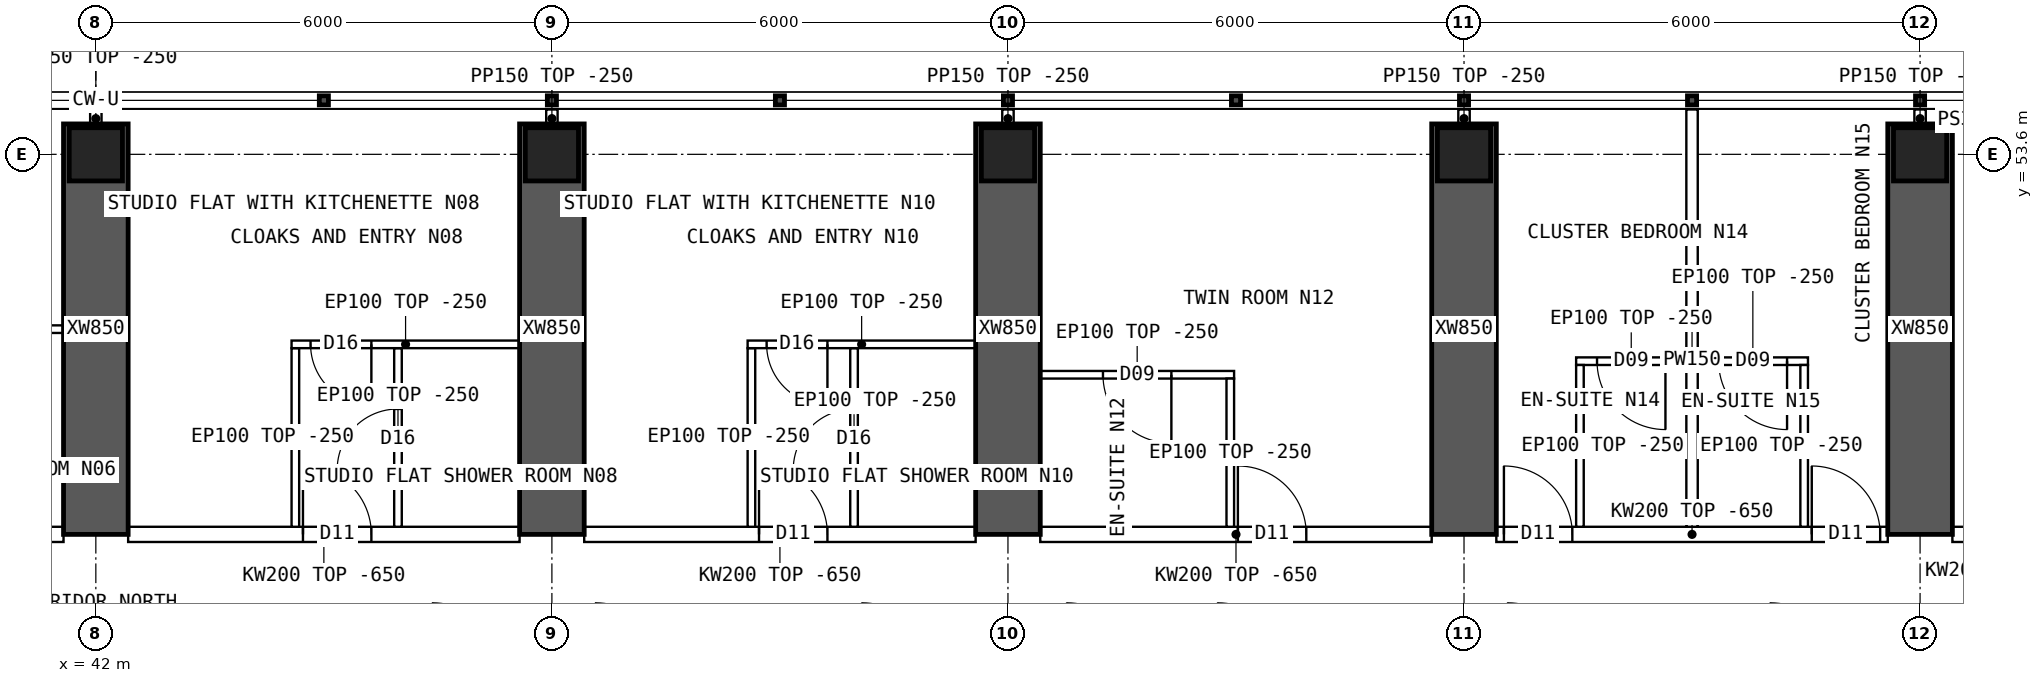
"""IFC4 building model, lengths in metres.
Left out: names, types, materials, properties, quantities, classifications, styles, units other than length and angle.
Written with IfcOpenShell. Run it as: python <this file> out.ifc"""

import sys

from ifc_helpers import new_model, si_unit, direction, frame, frame_2d, origin, origin_2d, place, context, subcontext, project, spatial, polyline, rectangle, hollow_rectangle, outline, extrude, element, fill, save


model = new_model("IFC4")
c1 = context("Model", 3, precision=1e-05, world=origin(), true_north=direction((0.0, 1.0)))
c2 = subcontext(c1, "Body", "Model", "MODEL_VIEW")
j1 = project(units=[si_unit("LENGTHUNIT", "METRE"), si_unit("PLANEANGLEUNIT", "RADIAN")], contexts=[c1])
p1 = place(None, origin())
s1 = spatial("IfcSite", under=j1, at=p1, CompositionType="ELEMENT")
p2 = place(p1, origin())
s2 = spatial("IfcBuilding", under=s1, at=p2, CompositionType="ELEMENT")
p3 = place(p2, frame((0.0, 0.0, 163.6)))
s3 = spatial("IfcBuildingStorey", under=s2, at=p3, CompositionType="ELEMENT", Elevation=163.6)
for number, where, z_axis, x_axis in (
    (1, (42.0, 53.6, 0.0), (0.0, 0.0, 1.0), (1.0, 0.0, 0.0)),
    (2, (48.0, 53.6, 0.0), (0.0, 0.0, 1.0), (1.0, 0.0, 0.0)),
    (3, (54.0, 53.6, 0.0), (0.0, 0.0, 1.0), (1.0, 0.0, 0.0)),
    (4, (60.0, 53.6, 0.0), (0.0, 0.0, 1.0), (1.0, 0.0, 0.0)),
    (5, (66.0, 53.6, 0.0), (0.0, 0.0, 1.0), (1.0, 0.0, 0.0)),
):
    element("IfcColumn", number, at=place(p3, frame(where, z_axis=z_axis, x_axis=x_axis)), inside=s3, PredefinedType="COLUMN", context=c2, shape_type="SweptSolid", body=[
        extrude(hollow_rectangle(XDim=0.7, YDim=0.7, WallThickness=0.07, at=origin_2d()), origin(), (0.0, 0.0, 1.0), 3.75),
    ])
for number, where, z_axis, x_axis in (
    (6, (42.0, 48.6, 0.0), (0.0, 0.0, 1.0), (0.0, 1.0, 0.0)),
    (7, (48.0, 48.6, 0.0), (0.0, 0.0, 1.0), (0.0, 1.0, 0.0)),
    (8, (54.0, 48.6, 0.0), (0.0, 0.0, 1.0), (0.0, 1.0, 0.0)),
    (9, (60.0, 48.6, 0.0), (0.0, 0.0, 1.0), (0.0, 1.0, 0.0)),
    (10, (66.0, 48.6, 0.0), (0.0, 0.0, 1.0), (0.0, 1.0, 0.0)),
):
    element("IfcWall", number, at=place(p3, frame(where, z_axis=z_axis, x_axis=x_axis)), inside=s3, PredefinedType="SHEAR", context=c2, shape_type="SweptSolid", body=[
        extrude(rectangle(XDim=5.4, YDim=0.85, at=frame_2d((2.7, 0.0))), origin(), (0.0, 0.0, 1.0), 3.75),
    ])
p4 = place(p3, frame((66.8, 54.05, 0.0), z_axis=(0.0, 0.0, 1.0), x_axis=(-1.0, 0.0, 0.0)))
e11 = element("IfcWall", 11, at=p4, inside=s3, PredefinedType="SOLIDWALL", context=c2, shape_type="SweptSolid", body=[
    extrude(rectangle(XDim=0.375, YDim=0.3, at=frame_2d((0.188, 0.0))), origin(), (0.0, 0.0, 1.0), 3.5),
])
p5 = place(p3, frame((36.425, 48.6, 0.0), z_axis=(0.0, 0.0, 1.0), x_axis=(1.0, 0.0, 0.0)))
e12 = element("IfcWall", 12, at=p5, inside=s3, PredefinedType="SOLIDWALL", context=c2, shape_type="SweptSolid", body=[
    extrude(outline(polyline([(0.0, 0.0), (5.15, 0.0), (5.15, 3.1), (0.0, 3.1), (0.0, 0.0)])), frame((0.0, 0.1, 0.0), z_axis=(0.0, -1.0, 0.0), x_axis=(1.0, 0.0, 0.0)), (0.0, 0.0, 1.0), 0.2),
])
p6 = place(p5, frame((0.3, 0.0, 0.0)))
e13 = element("IfcOpeningElement", 13, at=p6, cuts=e12, PredefinedType="OPENING", context=c2, shape_type="SweptSolid", body=[
    extrude(rectangle(XDim=1.0, YDim=2.1, at=frame_2d((0.5, 1.05))), frame((0.0, 0.11, 0.0), z_axis=(0.0, -1.0, 0.0), x_axis=(1.0, 0.0, 0.0)), (0.0, 0.0, 1.0), 0.22),
])
p7 = place(p3, frame((42.425, 48.6, 0.0), z_axis=(0.0, 0.0, 1.0), x_axis=(1.0, 0.0, 0.0)))
e14 = element("IfcWall", 14, at=p7, inside=s3, PredefinedType="SOLIDWALL", context=c2, shape_type="SweptSolid", body=[
    extrude(outline(polyline([(0.0, 0.0), (5.15, 0.0), (5.15, 3.1), (0.0, 3.1), (0.0, 0.0)])), frame((0.0, 0.1, 0.0), z_axis=(0.0, -1.0, 0.0), x_axis=(1.0, 0.0, 0.0)), (0.0, 0.0, 1.0), 0.2),
])
p8 = place(p7, frame((2.3, 0.0, 0.0)))
e15 = element("IfcOpeningElement", 15, at=p8, cuts=e14, PredefinedType="OPENING", context=c2, shape_type="SweptSolid", body=[
    extrude(rectangle(XDim=0.9, YDim=2.1, at=frame_2d((0.45, 1.05))), frame((0.0, 0.11, 0.0), z_axis=(0.0, -1.0, 0.0), x_axis=(1.0, 0.0, 0.0)), (0.0, 0.0, 1.0), 0.22),
])
p9 = place(p3, frame((48.425, 48.6, 0.0), z_axis=(0.0, 0.0, 1.0), x_axis=(1.0, 0.0, 0.0)))
e16 = element("IfcWall", 16, at=p9, inside=s3, PredefinedType="SOLIDWALL", context=c2, shape_type="SweptSolid", body=[
    extrude(outline(polyline([(0.0, 0.0), (5.15, 0.0), (5.15, 3.1), (0.0, 3.1), (0.0, 0.0)])), frame((0.0, 0.1, 0.0), z_axis=(0.0, -1.0, 0.0), x_axis=(1.0, 0.0, 0.0)), (0.0, 0.0, 1.0), 0.2),
])
p10 = place(p9, frame((2.3, 0.0, 0.0)))
e17 = element("IfcOpeningElement", 17, at=p10, cuts=e16, PredefinedType="OPENING", context=c2, shape_type="SweptSolid", body=[
    extrude(rectangle(XDim=0.9, YDim=2.1, at=frame_2d((0.45, 1.05))), frame((0.0, 0.11, 0.0), z_axis=(0.0, -1.0, 0.0), x_axis=(1.0, 0.0, 0.0)), (0.0, 0.0, 1.0), 0.22),
])
p11 = place(p3, frame((54.425, 48.6, 0.0), z_axis=(0.0, 0.0, 1.0), x_axis=(1.0, 0.0, 0.0)))
e18 = element("IfcWall", 18, at=p11, inside=s3, PredefinedType="SOLIDWALL", context=c2, shape_type="SweptSolid", body=[
    extrude(outline(polyline([(0.0, 0.0), (5.15, 0.0), (5.15, 3.1), (0.0, 3.1), (0.0, 0.0)])), frame((0.0, 0.1, 0.0), z_axis=(0.0, -1.0, 0.0), x_axis=(1.0, 0.0, 0.0)), (0.0, 0.0, 1.0), 0.2),
])
p12 = place(p11, frame((2.6, 0.0, 0.0)))
e19 = element("IfcOpeningElement", 19, at=p12, cuts=e18, PredefinedType="OPENING", context=c2, shape_type="SweptSolid", body=[
    extrude(rectangle(XDim=0.9, YDim=2.1, at=frame_2d((0.45, 1.05))), frame((0.0, 0.11, 0.0), z_axis=(0.0, -1.0, 0.0), x_axis=(1.0, 0.0, 0.0)), (0.0, 0.0, 1.0), 0.22),
])
p13 = place(p3, frame((60.425, 48.6, 0.0), z_axis=(0.0, 0.0, 1.0), x_axis=(1.0, 0.0, 0.0)))
e20 = element("IfcWall", 20, at=p13, inside=s3, PredefinedType="SOLIDWALL", context=c2, shape_type="SweptSolid", body=[
    extrude(outline(polyline([(0.0, 0.0), (5.15, 0.0), (5.15, 3.1), (0.0, 3.1), (0.0, 0.0)])), frame((0.0, 0.1, 0.0), z_axis=(0.0, -1.0, 0.0), x_axis=(1.0, 0.0, 0.0)), (0.0, 0.0, 1.0), 0.2),
])
p14 = place(p13, frame((0.1, 0.0, 0.0)))
e21 = element("IfcOpeningElement", 21, at=p14, cuts=e20, PredefinedType="OPENING", context=c2, shape_type="SweptSolid", body=[
    extrude(rectangle(XDim=0.9, YDim=2.1, at=frame_2d((0.45, 1.05))), frame((0.0, 0.11, 0.0), z_axis=(0.0, -1.0, 0.0), x_axis=(1.0, 0.0, 0.0)), (0.0, 0.0, 1.0), 0.22),
])
p15 = place(p13, frame((4.15, 0.0, 0.0)))
e22 = element("IfcOpeningElement", 22, at=p15, cuts=e20, PredefinedType="OPENING", context=c2, shape_type="SweptSolid", body=[
    extrude(rectangle(XDim=0.9, YDim=2.1, at=frame_2d((0.45, 1.05))), frame((0.0, 0.11, 0.0), z_axis=(0.0, -1.0, 0.0), x_axis=(1.0, 0.0, 0.0)), (0.0, 0.0, 1.0), 0.22),
])
p16 = place(p3, frame((66.425, 48.6, 0.0), z_axis=(0.0, 0.0, 1.0), x_axis=(1.0, 0.0, 0.0)))
e23 = element("IfcWall", 23, at=p16, inside=s3, PredefinedType="SOLIDWALL", context=c2, shape_type="SweptSolid", body=[
    extrude(rectangle(XDim=1.975, YDim=0.2, at=frame_2d((0.987, 0.0))), origin(), (0.0, 0.0, 1.0), 3.5),
])
p17 = place(p16, frame((0.2, 0.0, 0.0)))
e24 = element("IfcOpeningElement", 24, at=p17, cuts=e23, PredefinedType="OPENING", context=c2, shape_type="SweptSolid", body=[
    extrude(rectangle(XDim=0.9, YDim=2.1, at=frame_2d((0.45, 1.05))), frame((0.0, 0.11, 0.0), z_axis=(0.0, -1.0, 0.0), x_axis=(1.0, 0.0, 0.0)), (0.0, 0.0, 1.0), 0.22),
])
p18 = place(p3, frame((38.925, 51.3, 0.0), z_axis=(0.0, 0.0, 1.0), x_axis=(1.0, 0.0, 0.0)))
e25 = element("IfcWall", 25, at=p18, inside=s3, PredefinedType="PARTITIONING", context=c2, shape_type="SweptSolid", body=[
    extrude(rectangle(XDim=2.65, YDim=0.1, at=frame_2d((1.325, 0.0))), origin(), (0.0, 0.0, 1.0), 3.5),
])
p19 = place(p3, frame((44.575, 51.1, 0.0), z_axis=(0.0, 0.0, 1.0), x_axis=(1.0, 0.0, 0.0)))
e26 = element("IfcWall", 26, at=p19, inside=s3, PredefinedType="PARTITIONING", context=c2, shape_type="SweptSolid", body=[
    extrude(rectangle(XDim=3.0, YDim=0.1, at=frame_2d((1.5, 0.0))), origin(), (0.0, 0.0, 1.0), 3.5),
])
p20 = place(p19, frame((0.25, 0.0, 0.0)))
e27 = element("IfcOpeningElement", 27, at=p20, cuts=e26, PredefinedType="OPENING", context=c2, shape_type="SweptSolid", body=[
    extrude(rectangle(XDim=0.8, YDim=2.1, at=frame_2d((0.4, 1.05))), frame((0.0, 0.06, 0.0), z_axis=(0.0, -1.0, 0.0), x_axis=(1.0, 0.0, 0.0)), (0.0, 0.0, 1.0), 0.12),
])
p21 = place(p3, frame((44.625, 51.05, 0.0), z_axis=(0.0, 0.0, 1.0), x_axis=(0.0, -1.0, 0.0)))
e28 = element("IfcWall", 28, at=p21, inside=s3, PredefinedType="PARTITIONING", context=c2, shape_type="SweptSolid", body=[
    extrude(outline(polyline([(0.0, 0.0), (2.35, 0.0), (2.35, 3.1), (2.302, 3.1), (2.3, 3.5), (0.0, 3.5), (0.0, 0.0)])), frame((0.0, 0.05, 0.0), z_axis=(0.0, -1.0, 0.0), x_axis=(1.0, 0.0, 0.0)), (0.0, 0.0, 1.0), 0.1),
])
p22 = place(p3, frame((45.975, 51.05, 0.0), z_axis=(0.0, 0.0, 1.0), x_axis=(0.0, -1.0, 0.0)))
e29 = element("IfcWall", 29, at=p22, inside=s3, PredefinedType="PARTITIONING", context=c2, shape_type="SweptSolid", body=[
    extrude(outline(polyline([(0.0, 0.0), (2.35, 0.0), (2.35, 3.1), (2.302, 3.1), (2.3, 3.5), (0.0, 3.5), (0.0, 0.0)])), frame((0.0, 0.05, 0.0), z_axis=(0.0, -1.0, 0.0), x_axis=(1.0, 0.0, 0.0)), (0.0, 0.0, 1.0), 0.1),
])
p23 = place(p22, frame((0.8, 0.0, 0.0)))
e30 = element("IfcOpeningElement", 30, at=p23, cuts=e29, PredefinedType="OPENING", context=c2, shape_type="SweptSolid", body=[
    extrude(rectangle(XDim=0.8, YDim=2.1, at=frame_2d((0.4, 1.05))), frame((0.0, 0.06, 0.0), z_axis=(0.0, -1.0, 0.0), x_axis=(1.0, 0.0, 0.0)), (0.0, 0.0, 1.0), 0.12),
])
p24 = place(p3, frame((50.575, 51.1, 0.0), z_axis=(0.0, 0.0, 1.0), x_axis=(1.0, 0.0, 0.0)))
e31 = element("IfcWall", 31, at=p24, inside=s3, PredefinedType="PARTITIONING", context=c2, shape_type="SweptSolid", body=[
    extrude(rectangle(XDim=3.0, YDim=0.1, at=frame_2d((1.5, 0.0))), origin(), (0.0, 0.0, 1.0), 3.5),
])
p25 = place(p24, frame((0.25, 0.0, 0.0)))
e32 = element("IfcOpeningElement", 32, at=p25, cuts=e31, PredefinedType="OPENING", context=c2, shape_type="SweptSolid", body=[
    extrude(rectangle(XDim=0.8, YDim=2.1, at=frame_2d((0.4, 1.05))), frame((0.0, 0.06, 0.0), z_axis=(0.0, -1.0, 0.0), x_axis=(1.0, 0.0, 0.0)), (0.0, 0.0, 1.0), 0.12),
])
p26 = place(p3, frame((50.625, 51.05, 0.0), z_axis=(0.0, 0.0, 1.0), x_axis=(0.0, -1.0, 0.0)))
e33 = element("IfcWall", 33, at=p26, inside=s3, PredefinedType="PARTITIONING", context=c2, shape_type="SweptSolid", body=[
    extrude(outline(polyline([(0.0, 0.0), (2.35, 0.0), (2.35, 3.1), (2.302, 3.1), (2.3, 3.5), (0.0, 3.5), (0.0, 0.0)])), frame((0.0, 0.05, 0.0), z_axis=(0.0, -1.0, 0.0), x_axis=(1.0, 0.0, 0.0)), (0.0, 0.0, 1.0), 0.1),
])
p27 = place(p3, frame((51.975, 51.05, 0.0), z_axis=(0.0, 0.0, 1.0), x_axis=(0.0, -1.0, 0.0)))
e34 = element("IfcWall", 34, at=p27, inside=s3, PredefinedType="PARTITIONING", context=c2, shape_type="SweptSolid", body=[
    extrude(outline(polyline([(0.0, 0.0), (2.35, 0.0), (2.35, 3.1), (2.302, 3.1), (2.3, 3.5), (0.0, 3.5), (0.0, 0.0)])), frame((0.0, 0.05, 0.0), z_axis=(0.0, -1.0, 0.0), x_axis=(1.0, 0.0, 0.0)), (0.0, 0.0, 1.0), 0.1),
])
p28 = place(p27, frame((0.8, 0.0, 0.0)))
e35 = element("IfcOpeningElement", 35, at=p28, cuts=e34, PredefinedType="OPENING", context=c2, shape_type="SweptSolid", body=[
    extrude(rectangle(XDim=0.8, YDim=2.1, at=frame_2d((0.4, 1.05))), frame((0.0, 0.06, 0.0), z_axis=(0.0, -1.0, 0.0), x_axis=(1.0, 0.0, 0.0)), (0.0, 0.0, 1.0), 0.12),
])
p29 = place(p3, frame((54.425, 50.7, 0.0), z_axis=(0.0, 0.0, 1.0), x_axis=(1.0, 0.0, 0.0)))
e36 = element("IfcWall", 36, at=p29, inside=s3, PredefinedType="PARTITIONING", context=c2, shape_type="SweptSolid", body=[
    extrude(rectangle(XDim=2.55, YDim=0.1, at=frame_2d((1.275, 0.0))), origin(), (0.0, 0.0, 1.0), 3.5),
])
p30 = place(p29, frame((0.825, 0.0, 0.0)))
e37 = element("IfcOpeningElement", 37, at=p30, cuts=e36, PredefinedType="OPENING", context=c2, shape_type="SweptSolid", body=[
    extrude(rectangle(XDim=0.9, YDim=2.1, at=frame_2d((0.45, 1.05))), frame((0.0, 0.06, 0.0), z_axis=(0.0, -1.0, 0.0), x_axis=(1.0, 0.0, 0.0)), (0.0, 0.0, 1.0), 0.12),
])
p31 = place(p3, frame((56.925, 50.65, 0.0), z_axis=(0.0, 0.0, 1.0), x_axis=(0.0, -1.0, 0.0)))
e38 = element("IfcWall", 38, at=p31, inside=s3, PredefinedType="PARTITIONING", context=c2, shape_type="SweptSolid", body=[
    extrude(outline(polyline([(0.0, 0.0), (1.95, 0.0), (1.95, 3.1), (1.902, 3.1), (1.9, 3.5), (0.0, 3.5), (0.0, 0.0)])), frame((0.0, 0.05, 0.0), z_axis=(0.0, -1.0, 0.0), x_axis=(1.0, 0.0, 0.0)), (0.0, 0.0, 1.0), 0.1),
])
p32 = place(p3, frame((63.0, 54.19, 0.0), z_axis=(0.0, 0.0, 1.0), x_axis=(0.0, -1.0, 0.0)))
e39 = element("IfcWall", 39, at=p32, inside=s3, PredefinedType="PARTITIONING", context=c2, shape_type="SweptSolid", body=[
    extrude(outline(polyline([(0.0, 0.0), (5.49, 0.0), (5.49, 3.1), (5.442, 3.1), (5.44, 3.5), (0.792, 3.5), (0.79, 3.1), (0.392, 3.1), (0.39, 3.5), (0.0, 3.5), (0.0, 0.0)])), frame((0.0, 0.075, 0.0), z_axis=(0.0, -1.0, 0.0), x_axis=(1.0, 0.0, 0.0)), (0.0, 0.0, 1.0), 0.15),
])
p33 = place(p3, frame((61.475, 50.879, 0.0), z_axis=(0.0, 0.0, 1.0), x_axis=(1.0, 0.0, 0.0)))
e40 = element("IfcWall", 40, at=p33, inside=s3, PredefinedType="PARTITIONING", context=c2, shape_type="SweptSolid", body=[
    extrude(rectangle(XDim=1.45, YDim=0.1, at=frame_2d((0.725, 0.0))), origin(), (0.0, 0.0, 1.0), 3.5),
])
p34 = place(p33, frame((0.275, 0.0, 0.0)))
e41 = element("IfcOpeningElement", 41, at=p34, cuts=e40, PredefinedType="OPENING", context=c2, shape_type="SweptSolid", body=[
    extrude(rectangle(XDim=0.9, YDim=2.1, at=frame_2d((0.45, 1.05))), frame((0.0, 0.06, 0.0), z_axis=(0.0, -1.0, 0.0), x_axis=(1.0, 0.0, 0.0)), (0.0, 0.0, 1.0), 0.12),
])
p35 = place(p3, frame((61.525, 50.829, 0.0), z_axis=(0.0, 0.0, 1.0), x_axis=(0.0, -1.0, 0.0)))
e42 = element("IfcWall", 42, at=p35, inside=s3, PredefinedType="PARTITIONING", context=c2, shape_type="SweptSolid", body=[
    extrude(outline(polyline([(0.0, 0.0), (2.129, 0.0), (2.129, 3.1), (2.081, 3.1), (2.079, 3.5), (0.0, 3.5), (0.0, 0.0)])), frame((0.0, 0.05, 0.0), z_axis=(0.0, -1.0, 0.0), x_axis=(1.0, 0.0, 0.0)), (0.0, 0.0, 1.0), 0.1),
])
p36 = place(p3, frame((63.075, 50.879, 0.0), z_axis=(0.0, 0.0, 1.0), x_axis=(1.0, 0.0, 0.0)))
e43 = element("IfcWall", 43, at=p36, inside=s3, PredefinedType="PARTITIONING", context=c2, shape_type="SweptSolid", body=[
    extrude(rectangle(XDim=1.45, YDim=0.1, at=frame_2d((0.725, 0.0))), origin(), (0.0, 0.0, 1.0), 3.5),
])
p37 = place(p36, frame((0.275, 0.0, 0.0)))
e44 = element("IfcOpeningElement", 44, at=p37, cuts=e43, PredefinedType="OPENING", context=c2, shape_type="SweptSolid", body=[
    extrude(rectangle(XDim=0.9, YDim=2.1, at=frame_2d((0.45, 1.05))), frame((0.0, 0.06, 0.0), z_axis=(0.0, -1.0, 0.0), x_axis=(1.0, 0.0, 0.0)), (0.0, 0.0, 1.0), 0.12),
])
p38 = place(p3, frame((64.475, 50.829, 0.0), z_axis=(0.0, 0.0, 1.0), x_axis=(0.0, -1.0, 0.0)))
e45 = element("IfcWall", 45, at=p38, inside=s3, PredefinedType="PARTITIONING", context=c2, shape_type="SweptSolid", body=[
    extrude(outline(polyline([(0.0, 0.0), (2.129, 0.0), (2.129, 3.1), (2.081, 3.1), (2.079, 3.5), (0.0, 3.5), (0.0, 0.0)])), frame((0.0, 0.05, 0.0), z_axis=(0.0, -1.0, 0.0), x_axis=(1.0, 0.0, 0.0)), (0.0, 0.0, 1.0), 0.1),
])
for number, where, z_axis, x_axis in (
    (46, (42.0, 53.95, 0.0), (0.0, 0.0, 1.0), (0.0, 1.0, 0.0)),
    (47, (48.0, 53.95, 0.0), (0.0, 0.0, 1.0), (0.0, 1.0, 0.0)),
    (48, (54.0, 53.95, 0.0), (0.0, 0.0, 1.0), (0.0, 1.0, 0.0)),
    (49, (60.0, 53.95, 0.0), (0.0, 0.0, 1.0), (0.0, 1.0, 0.0)),
    (50, (66.0, 53.95, 0.0), (0.0, 0.0, 1.0), (0.0, 1.0, 0.0)),
):
    element("IfcWall", number, at=place(p3, frame(where, z_axis=z_axis, x_axis=x_axis)), inside=s3, PredefinedType="PARTITIONING", context=c2, shape_type="SweptSolid", body=[
        extrude(rectangle(XDim=0.24, YDim=0.15, at=frame_2d((0.12, 0.0))), origin(), (0.0, 0.0, 1.0), 3.5),
    ])
p39 = place(p20, origin())
e51 = element("IfcDoor", 51, at=p39, inside=s3, OperationType="SINGLE_SWING_RIGHT", PredefinedType="DOOR", context=c2, shape_type="SweptSolid", body=[
    extrude(rectangle(XDim=0.8, YDim=2.1, at=frame_2d((0.4, 1.05))), frame((0.0, 0.025, 0.0), z_axis=(0.0, -1.0, 0.0), x_axis=(1.0, 0.0, 0.0)), (0.0, 0.0, 1.0), 0.05),
])
fill(e27, e51)
p40 = place(p23, origin())
e52 = element("IfcDoor", 52, at=p40, inside=s3, OperationType="SINGLE_SWING_RIGHT", PredefinedType="DOOR", context=c2, shape_type="SweptSolid", body=[
    extrude(rectangle(XDim=0.8, YDim=2.1, at=frame_2d((0.4, 1.05))), frame((0.0, 0.025, 0.0), z_axis=(0.0, -1.0, 0.0), x_axis=(1.0, 0.0, 0.0)), (0.0, 0.0, 1.0), 0.05),
])
fill(e30, e52)
p41 = place(p8, origin())
e53 = element("IfcDoor", 53, at=p41, inside=s3, OperationType="SINGLE_SWING_LEFT", PredefinedType="DOOR", context=c2, shape_type="SweptSolid", body=[
    extrude(rectangle(XDim=0.9, YDim=2.1, at=frame_2d((0.45, 1.05))), frame((0.0, 0.025, 0.0), z_axis=(0.0, -1.0, 0.0), x_axis=(1.0, 0.0, 0.0)), (0.0, 0.0, 1.0), 0.05),
])
fill(e15, e53)
p42 = place(p25, origin())
e54 = element("IfcDoor", 54, at=p42, inside=s3, OperationType="SINGLE_SWING_RIGHT", PredefinedType="DOOR", context=c2, shape_type="SweptSolid", body=[
    extrude(rectangle(XDim=0.8, YDim=2.1, at=frame_2d((0.4, 1.05))), frame((0.0, 0.025, 0.0), z_axis=(0.0, -1.0, 0.0), x_axis=(1.0, 0.0, 0.0)), (0.0, 0.0, 1.0), 0.05),
])
fill(e32, e54)
p43 = place(p28, origin())
e55 = element("IfcDoor", 55, at=p43, inside=s3, OperationType="SINGLE_SWING_RIGHT", PredefinedType="DOOR", context=c2, shape_type="SweptSolid", body=[
    extrude(rectangle(XDim=0.8, YDim=2.1, at=frame_2d((0.4, 1.05))), frame((0.0, 0.025, 0.0), z_axis=(0.0, -1.0, 0.0), x_axis=(1.0, 0.0, 0.0)), (0.0, 0.0, 1.0), 0.05),
])
fill(e35, e55)
p44 = place(p10, origin())
e56 = element("IfcDoor", 56, at=p44, inside=s3, OperationType="SINGLE_SWING_LEFT", PredefinedType="DOOR", context=c2, shape_type="SweptSolid", body=[
    extrude(rectangle(XDim=0.9, YDim=2.1, at=frame_2d((0.45, 1.05))), frame((0.0, 0.025, 0.0), z_axis=(0.0, -1.0, 0.0), x_axis=(1.0, 0.0, 0.0)), (0.0, 0.0, 1.0), 0.05),
])
fill(e17, e56)
p45 = place(p30, origin())
e57 = element("IfcDoor", 57, at=p45, inside=s3, OperationType="SINGLE_SWING_RIGHT", PredefinedType="DOOR", context=c2, shape_type="SweptSolid", body=[
    extrude(rectangle(XDim=0.9, YDim=2.1, at=frame_2d((0.45, 1.05))), frame((0.0, 0.025, 0.0), z_axis=(0.0, -1.0, 0.0), x_axis=(1.0, 0.0, 0.0)), (0.0, 0.0, 1.0), 0.05),
])
fill(e37, e57)
p46 = place(p12, origin())
e58 = element("IfcDoor", 58, at=p46, inside=s3, OperationType="SINGLE_SWING_LEFT", PredefinedType="DOOR", context=c2, shape_type="SweptSolid", body=[
    extrude(rectangle(XDim=0.9, YDim=2.1, at=frame_2d((0.45, 1.05))), frame((0.0, 0.025, 0.0), z_axis=(0.0, -1.0, 0.0), x_axis=(1.0, 0.0, 0.0)), (0.0, 0.0, 1.0), 0.05),
])
fill(e19, e58)
p47 = place(p34, origin())
e59 = element("IfcDoor", 59, at=p47, inside=s3, OperationType="SINGLE_SWING_RIGHT", PredefinedType="DOOR", context=c2, shape_type="SweptSolid", body=[
    extrude(rectangle(XDim=0.9, YDim=2.1, at=frame_2d((0.45, 1.05))), frame((0.0, 0.025, 0.0), z_axis=(0.0, -1.0, 0.0), x_axis=(1.0, 0.0, 0.0)), (0.0, 0.0, 1.0), 0.05),
])
fill(e41, e59)
p48 = place(p14, origin())
e60 = element("IfcDoor", 60, at=p48, inside=s3, OperationType="SINGLE_SWING_LEFT", PredefinedType="DOOR", context=c2, shape_type="SweptSolid", body=[
    extrude(rectangle(XDim=0.9, YDim=2.1, at=frame_2d((0.45, 1.05))), frame((0.0, 0.025, 0.0), z_axis=(0.0, -1.0, 0.0), x_axis=(1.0, 0.0, 0.0)), (0.0, 0.0, 1.0), 0.05),
])
fill(e21, e60)
p49 = place(p37, origin())
e61 = element("IfcDoor", 61, at=p49, inside=s3, OperationType="SINGLE_SWING_RIGHT", PredefinedType="DOOR", context=c2, shape_type="SweptSolid", body=[
    extrude(rectangle(XDim=0.9, YDim=2.1, at=frame_2d((0.45, 1.05))), frame((0.0, 0.025, 0.0), z_axis=(0.0, -1.0, 0.0), x_axis=(1.0, 0.0, 0.0)), (0.0, 0.0, 1.0), 0.05),
])
fill(e44, e61)
p50 = place(p15, origin())
e62 = element("IfcDoor", 62, at=p50, inside=s3, OperationType="SINGLE_SWING_LEFT", PredefinedType="DOOR", context=c2, shape_type="SweptSolid", body=[
    extrude(rectangle(XDim=0.9, YDim=2.1, at=frame_2d((0.45, 1.05))), frame((0.0, 0.025, 0.0), z_axis=(0.0, -1.0, 0.0), x_axis=(1.0, 0.0, 0.0)), (0.0, 0.0, 1.0), 0.05),
])
fill(e22, e62)
save(model, sys.argv[1])
